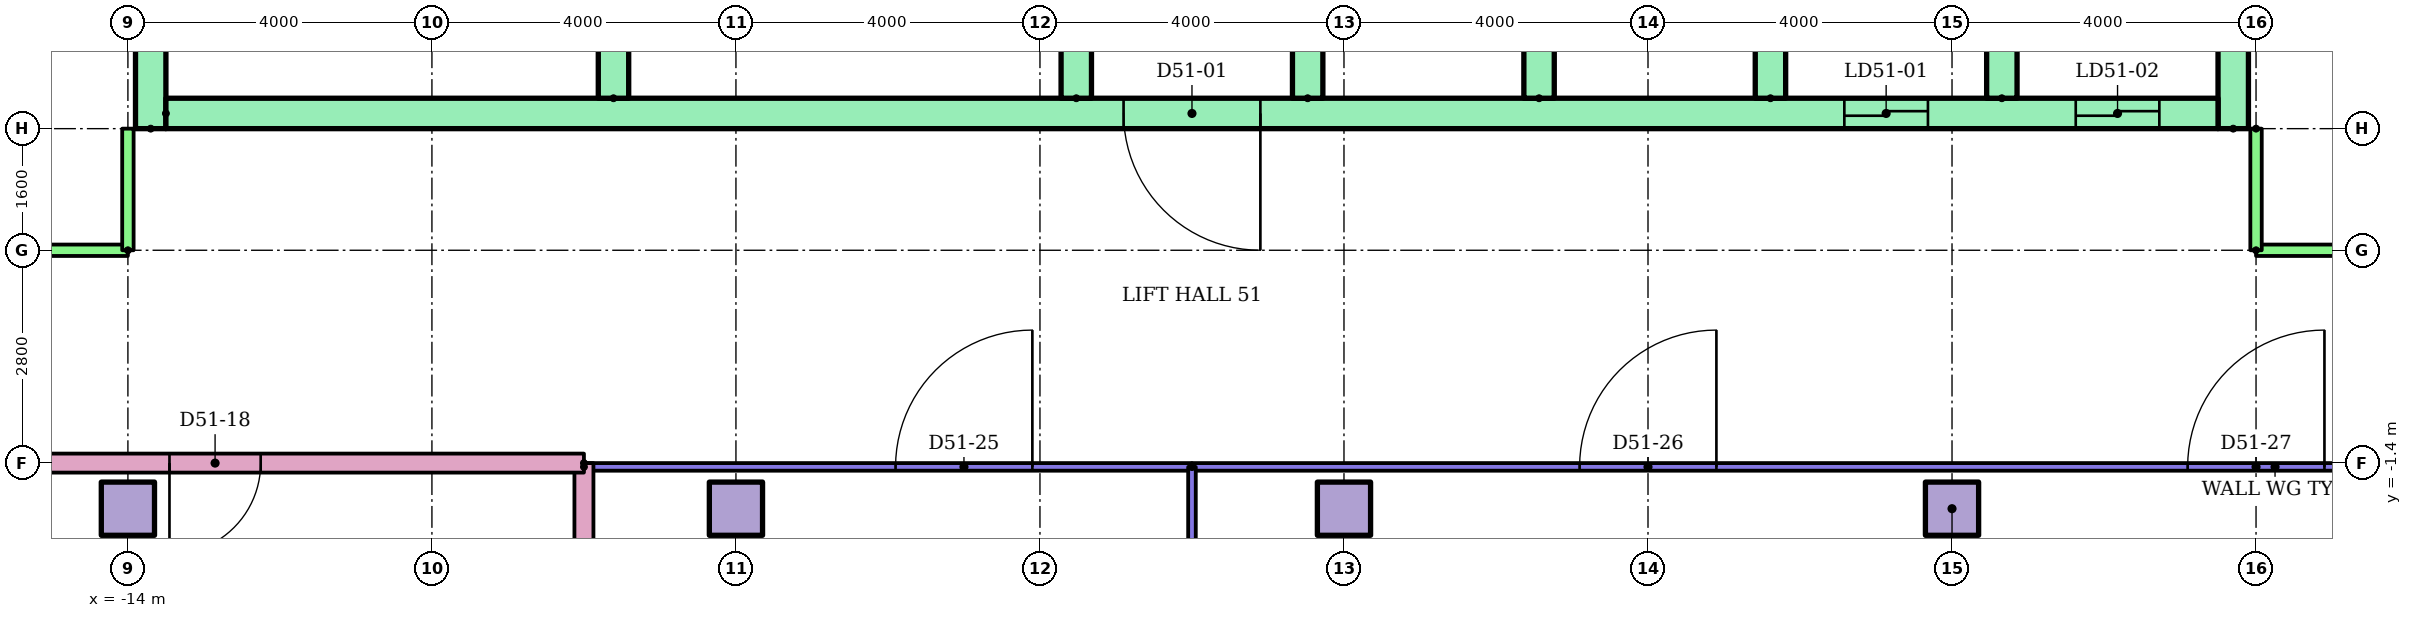
"""IFC4 building model, lengths in metres.
Left out: names, types, materials, properties, quantities, classifications, styles, units other than length and angle.
Written with IfcOpenShell. Run it as: python <this file> out.ifc"""

import sys

from ifc_helpers import new_model, si_unit, direction, frame, frame_2d, origin, origin_2d, place, context, subcontext, project, spatial, rectangle, extrude, element, fill, save


model = new_model("IFC4")
c1 = context("Model", 3, precision=1e-05, world=origin(), true_north=direction((0.0, 1.0)))
c2 = subcontext(c1, "Body", "Model", "MODEL_VIEW")
j1 = project(units=[si_unit("LENGTHUNIT", "METRE"), si_unit("PLANEANGLEUNIT", "RADIAN")], contexts=[c1])
p1 = place(None, origin())
s1 = spatial("IfcSite", under=j1, at=p1, CompositionType="ELEMENT")
p2 = place(p1, origin())
s2 = spatial("IfcBuilding", under=s1, at=p2, CompositionType="ELEMENT")
p3 = place(p2, frame((0.0, 0.0, 194.1)))
s3 = spatial("IfcBuildingStorey", under=s2, at=p3, CompositionType="ELEMENT", Elevation=194.1)
for number, where in (
    (1, (-14.0, -2.0, 0.0)),
    (2, (-6.0, -2.0, 0.0)),
    (3, (2.0, -2.0, 0.0)),
    (4, (10.0, -2.0, 0.0)),
):
    element("IfcColumn", number, at=place(p3, frame(where)), inside=s3, PredefinedType="COLUMN", context=c2, shape_type="SweptSolid", body=[
        extrude(rectangle(XDim=0.7, YDim=0.7, at=origin_2d()), origin(), (0.0, 0.0, 1.0), 9.6),
    ])
for number, where, z_axis, x_axis in (
    (5, (-13.7, 3.0, 0.0), (0.0, 0.0, 1.0), (0.0, 1.0, 0.0)),
    (6, (13.7, 3.0, 0.0), (0.0, 0.0, 1.0), (0.0, 1.0, 0.0)),
):
    element("IfcWall", number, at=place(p3, frame(where, z_axis=z_axis, x_axis=x_axis)), inside=s3, PredefinedType="SHEAR", context=c2, shape_type="SweptSolid", body=[
        extrude(rectangle(XDim=17.0, YDim=0.4, at=frame_2d((8.5, 0.0))), origin(), (0.0, 0.0, 1.0), 8.8),
    ])
p4 = place(p3, frame((-13.5, 3.2, 0.0)))
e7 = element("IfcWall", 7, at=p4, inside=s3, PredefinedType="SHEAR", context=c2, shape_type="SweptSolid", body=[
    extrude(rectangle(XDim=27.0, YDim=0.4, at=frame_2d((13.5, 0.0))), origin(), (0.0, 0.0, 1.0), 8.8),
])
p5 = place(p4, frame((22.083, 0.0, 0.0)))
e8 = element("IfcOpeningElement", 8, at=p5, cuts=e7, PredefinedType="OPENING", context=c2, shape_type="SweptSolid", body=[
    extrude(rectangle(XDim=1.1, YDim=2.1, at=frame_2d((0.55, 1.05))), frame((0.0, 0.21, 0.0), z_axis=(0.0, -1.0, 0.0), x_axis=(1.0, 0.0, 0.0)), (0.0, 0.0, 1.0), 0.42),
])
p6 = place(p4, frame((25.128, 0.0, 0.0)))
e9 = element("IfcOpeningElement", 9, at=p6, cuts=e7, PredefinedType="OPENING", context=c2, shape_type="SweptSolid", body=[
    extrude(rectangle(XDim=1.1, YDim=2.1, at=frame_2d((0.55, 1.05))), frame((0.0, 0.21, 0.0), z_axis=(0.0, -1.0, 0.0), x_axis=(1.0, 0.0, 0.0)), (0.0, 0.0, 1.0), 0.42),
])
p7 = place(p4, frame((12.6, 0.0, 0.0)))
e10 = element("IfcOpeningElement", 10, at=p7, cuts=e7, PredefinedType="OPENING", context=c2, shape_type="SweptSolid", body=[
    extrude(rectangle(XDim=1.8, YDim=2.1, at=frame_2d((0.9, 1.05))), frame((0.0, 0.21, 0.0), z_axis=(0.0, -1.0, 0.0), x_axis=(1.0, 0.0, 0.0)), (0.0, 0.0, 1.0), 0.42),
])
for number, where, z_axis, x_axis in (
    (11, (-7.611, 3.4, 0.0), (0.0, 0.0, 1.0), (0.0, 1.0, 0.0)),
    (12, (-1.522, 3.4, 0.0), (0.0, 0.0, 1.0), (0.0, 1.0, 0.0)),
    (13, (1.522, 3.4, 0.0), (0.0, 0.0, 1.0), (0.0, 1.0, 0.0)),
    (14, (4.567, 3.4, 0.0), (0.0, 0.0, 1.0), (0.0, 1.0, 0.0)),
    (15, (7.611, 3.4, 0.0), (0.0, 0.0, 1.0), (0.0, 1.0, 0.0)),
    (16, (10.656, 3.4, 0.0), (0.0, 0.0, 1.0), (0.0, 1.0, 0.0)),
):
    element("IfcWall", number, at=place(p3, frame(where, z_axis=z_axis, x_axis=x_axis)), inside=s3, PredefinedType="SHEAR", context=c2, shape_type="SweptSolid", body=[
        extrude(rectangle(XDim=3.0, YDim=0.4, at=frame_2d((1.5, 0.0))), origin(), (0.0, 0.0, 1.0), 8.8),
    ])
p8 = place(p3, frame((-8.0, -11.4, 0.0), z_axis=(0.0, 0.0, 1.0), x_axis=(0.0, 1.0, 0.0)))
e17 = element("IfcWall", 17, at=p8, inside=s3, PredefinedType="PARTITIONING", context=c2, shape_type="SweptSolid", body=[
    extrude(rectangle(XDim=10.0, YDim=0.25, at=frame_2d((5.0, 0.0))), origin(), (0.0, 0.0, 1.0), 8.8),
])
p9 = place(p3, frame((-8.0, -1.4, 0.0), z_axis=(0.0, 0.0, 1.0), x_axis=(-1.0, 0.0, 0.0)))
e18 = element("IfcWall", 18, at=p9, inside=s3, PredefinedType="PARTITIONING", context=c2, shape_type="SweptSolid", body=[
    extrude(rectangle(XDim=12.0, YDim=0.25, at=frame_2d((6.0, 0.0))), origin(), (0.0, 0.0, 1.0), 8.8),
])
p10 = place(p9, frame((10.7, 0.0, 0.0)))
e19 = element("IfcOpeningElement", 19, at=p10, cuts=e18, PredefinedType="OPENING", context=c2, shape_type="SweptSolid", body=[
    extrude(rectangle(XDim=1.0, YDim=2.1, at=frame_2d((0.5, 1.05))), frame((0.0, 0.135, 0.0), z_axis=(0.0, -1.0, 0.0), x_axis=(1.0, 0.0, 0.0)), (0.0, 0.0, 1.0), 0.27),
])
p11 = place(p9, frame((4.253, 0.0, 0.0)))
e20 = element("IfcOpeningElement", 20, at=p11, cuts=e18, PredefinedType="OPENING", context=c2, shape_type="SweptSolid", body=[
    extrude(rectangle(XDim=1.2, YDim=2.1, at=frame_2d((0.6, 1.05))), frame((0.0, 0.135, 0.0), z_axis=(0.0, -1.0, 0.0), x_axis=(1.0, 0.0, 0.0)), (0.0, 0.0, 1.0), 0.27),
])
p12 = place(p3, frame((-22.0, 1.4, 0.0)))
e21 = element("IfcWall", 21, at=p12, inside=s3, PredefinedType="PARTITIONING", context=c2, shape_type="SweptSolid", body=[
    extrude(rectangle(XDim=8.0, YDim=0.15, at=frame_2d((4.0, 0.0))), origin(), (0.0, 0.0, 1.0), 8.8),
])
p13 = place(p12, frame((3.4, 0.0, 0.0)))
e22 = element("IfcOpeningElement", 22, at=p13, cuts=e21, PredefinedType="OPENING", context=c2, shape_type="SweptSolid", body=[
    extrude(rectangle(XDim=1.2, YDim=2.1, at=frame_2d((0.6, 1.05))), frame((0.0, 0.085, 0.0), z_axis=(0.0, -1.0, 0.0), x_axis=(1.0, 0.0, 0.0)), (0.0, 0.0, 1.0), 0.17),
])
p14 = place(p3, frame((-14.0, 1.4, 0.0), z_axis=(0.0, 0.0, 1.0), x_axis=(0.0, 1.0, 0.0)))
e23 = element("IfcWall", 23, at=p14, inside=s3, PredefinedType="PARTITIONING", context=c2, shape_type="SweptSolid", body=[
    extrude(rectangle(XDim=1.6, YDim=0.15, at=frame_2d((0.8, 0.0))), origin(), (0.0, 0.0, 1.0), 8.8),
])
p15 = place(p3, frame((14.0, 1.4, 0.0)))
e24 = element("IfcWall", 24, at=p15, inside=s3, PredefinedType="PARTITIONING", context=c2, shape_type="SweptSolid", body=[
    extrude(rectangle(XDim=8.0, YDim=0.15, at=frame_2d((4.0, 0.0))), origin(), (0.0, 0.0, 1.0), 8.8),
])
p16 = place(p15, frame((4.547, 0.0, 0.0)))
e25 = element("IfcOpeningElement", 25, at=p16, cuts=e24, PredefinedType="OPENING", context=c2, shape_type="SweptSolid", body=[
    extrude(rectangle(XDim=1.2, YDim=2.1, at=frame_2d((0.6, 1.05))), frame((0.0, 0.085, 0.0), z_axis=(0.0, -1.0, 0.0), x_axis=(1.0, 0.0, 0.0)), (0.0, 0.0, 1.0), 0.17),
])
p17 = place(p3, frame((14.0, 3.0, 0.0), z_axis=(0.0, 0.0, 1.0), x_axis=(0.0, -1.0, 0.0)))
e26 = element("IfcWall", 26, at=p17, inside=s3, PredefinedType="PARTITIONING", context=c2, shape_type="SweptSolid", body=[
    extrude(rectangle(XDim=1.6, YDim=0.15, at=frame_2d((0.8, 0.0))), origin(), (0.0, 0.0, 1.0), 8.8),
])
p18 = place(p3, frame((-8.0, -1.45, 0.0)))
e27 = element("IfcWall", 27, at=p18, inside=s3, PredefinedType="PARTITIONING", context=c2, shape_type="SweptSolid", body=[
    extrude(rectangle(XDim=8.0, YDim=0.1, at=frame_2d((4.0, 0.0))), origin(), (0.0, 0.0, 1.0), 8.8),
])
p19 = place(p18, frame((4.1, 0.0, 0.0)))
e28 = element("IfcOpeningElement", 28, at=p19, cuts=e27, PredefinedType="OPENING", context=c2, shape_type="SweptSolid", body=[
    extrude(rectangle(XDim=1.8, YDim=2.1, at=frame_2d((0.9, 1.05))), frame((0.0, 0.06, 0.0), z_axis=(0.0, -1.0, 0.0), x_axis=(1.0, 0.0, 0.0)), (0.0, 0.0, 1.0), 0.12),
])
p20 = place(p3, frame((0.0, -1.45, 0.0)))
e29 = element("IfcWall", 29, at=p20, inside=s3, PredefinedType="PARTITIONING", context=c2, shape_type="SweptSolid", body=[
    extrude(rectangle(XDim=22.0, YDim=0.1, at=frame_2d((11.0, 0.0))), origin(), (0.0, 0.0, 1.0), 8.8),
])
p21 = place(p20, frame((5.1, 0.0, 0.0)))
e30 = element("IfcOpeningElement", 30, at=p21, cuts=e29, PredefinedType="OPENING", context=c2, shape_type="SweptSolid", body=[
    extrude(rectangle(XDim=1.8, YDim=2.1, at=frame_2d((0.9, 1.05))), frame((0.0, 0.06, 0.0), z_axis=(0.0, -1.0, 0.0), x_axis=(1.0, 0.0, 0.0)), (0.0, 0.0, 1.0), 0.12),
])
p22 = place(p20, frame((13.1, 0.0, 0.0)))
e31 = element("IfcOpeningElement", 31, at=p22, cuts=e29, PredefinedType="OPENING", context=c2, shape_type="SweptSolid", body=[
    extrude(rectangle(XDim=1.8, YDim=2.1, at=frame_2d((0.9, 1.05))), frame((0.0, 0.06, 0.0), z_axis=(0.0, -1.0, 0.0), x_axis=(1.0, 0.0, 0.0)), (0.0, 0.0, 1.0), 0.12),
])
p23 = place(p3, frame((0.0, -1.45, 0.0), z_axis=(0.0, 0.0, 1.0), x_axis=(0.0, -1.0, 0.0)))
e32 = element("IfcWall", 32, at=p23, inside=s3, PredefinedType="PARTITIONING", context=c2, shape_type="SweptSolid", body=[
    extrude(rectangle(XDim=14.65, YDim=0.1, at=frame_2d((7.325, 0.0))), origin(), (0.0, 0.0, 1.0), 8.8),
])
p24 = place(p5, origin())
e33 = element("IfcDoor", 33, at=p24, inside=s3, OperationType="SLIDING_TO_LEFT", PredefinedType="DOOR", context=c2, shape_type="SweptSolid", body=[
    extrude(rectangle(XDim=1.1, YDim=2.1, at=frame_2d((0.55, 1.05))), frame((0.0, 0.025, 0.0), z_axis=(0.0, -1.0, 0.0), x_axis=(1.0, 0.0, 0.0)), (0.0, 0.0, 1.0), 0.05),
])
fill(e8, e33)
p25 = place(p6, origin())
e34 = element("IfcDoor", 34, at=p25, inside=s3, OperationType="SLIDING_TO_LEFT", PredefinedType="DOOR", context=c2, shape_type="SweptSolid", body=[
    extrude(rectangle(XDim=1.1, YDim=2.1, at=frame_2d((0.55, 1.05))), frame((0.0, 0.025, 0.0), z_axis=(0.0, -1.0, 0.0), x_axis=(1.0, 0.0, 0.0)), (0.0, 0.0, 1.0), 0.05),
])
fill(e9, e34)
p26 = place(p7, frame((1.8, 0.0, 0.0), z_axis=(0.0, 0.0, 1.0), x_axis=(-1.0, 0.0, 0.0)))
e35 = element("IfcDoor", 35, at=p26, inside=s3, OperationType="DOUBLE_DOOR_SINGLE_SWING", PredefinedType="DOOR", context=c2, shape_type="SweptSolid", body=[
    extrude(rectangle(XDim=1.8, YDim=2.1, at=frame_2d((0.9, 1.05))), frame((0.0, 0.025, 0.0), z_axis=(0.0, -1.0, 0.0), x_axis=(1.0, 0.0, 0.0)), (0.0, 0.0, 1.0), 0.05),
])
fill(e10, e35)
p27 = place(p11, origin())
e36 = element("IfcDoor", 36, at=p27, inside=s3, OperationType="SINGLE_SWING_RIGHT", PredefinedType="DOOR", context=c2, shape_type="SweptSolid", body=[
    extrude(rectangle(XDim=1.2, YDim=2.1, at=frame_2d((0.6, 1.05))), frame((0.0, 0.025, 0.0), z_axis=(0.0, -1.0, 0.0), x_axis=(1.0, 0.0, 0.0)), (0.0, 0.0, 1.0), 0.05),
])
fill(e20, e36)
p28 = place(p19, origin())
e37 = element("IfcDoor", 37, at=p28, inside=s3, OperationType="DOUBLE_DOOR_SINGLE_SWING", PredefinedType="DOOR", context=c2, shape_type="SweptSolid", body=[
    extrude(rectangle(XDim=1.8, YDim=2.1, at=frame_2d((0.9, 1.05))), frame((0.0, 0.025, 0.0), z_axis=(0.0, -1.0, 0.0), x_axis=(1.0, 0.0, 0.0)), (0.0, 0.0, 1.0), 0.05),
])
fill(e28, e37)
p29 = place(p21, origin())
e38 = element("IfcDoor", 38, at=p29, inside=s3, OperationType="DOUBLE_DOOR_SINGLE_SWING", PredefinedType="DOOR", context=c2, shape_type="SweptSolid", body=[
    extrude(rectangle(XDim=1.8, YDim=2.1, at=frame_2d((0.9, 1.05))), frame((0.0, 0.025, 0.0), z_axis=(0.0, -1.0, 0.0), x_axis=(1.0, 0.0, 0.0)), (0.0, 0.0, 1.0), 0.05),
])
fill(e30, e38)
p30 = place(p22, origin())
e39 = element("IfcDoor", 39, at=p30, inside=s3, OperationType="DOUBLE_DOOR_SINGLE_SWING", PredefinedType="DOOR", context=c2, shape_type="SweptSolid", body=[
    extrude(rectangle(XDim=1.8, YDim=2.1, at=frame_2d((0.9, 1.05))), frame((0.0, 0.025, 0.0), z_axis=(0.0, -1.0, 0.0), x_axis=(1.0, 0.0, 0.0)), (0.0, 0.0, 1.0), 0.05),
])
fill(e31, e39)
save(model, sys.argv[1])
